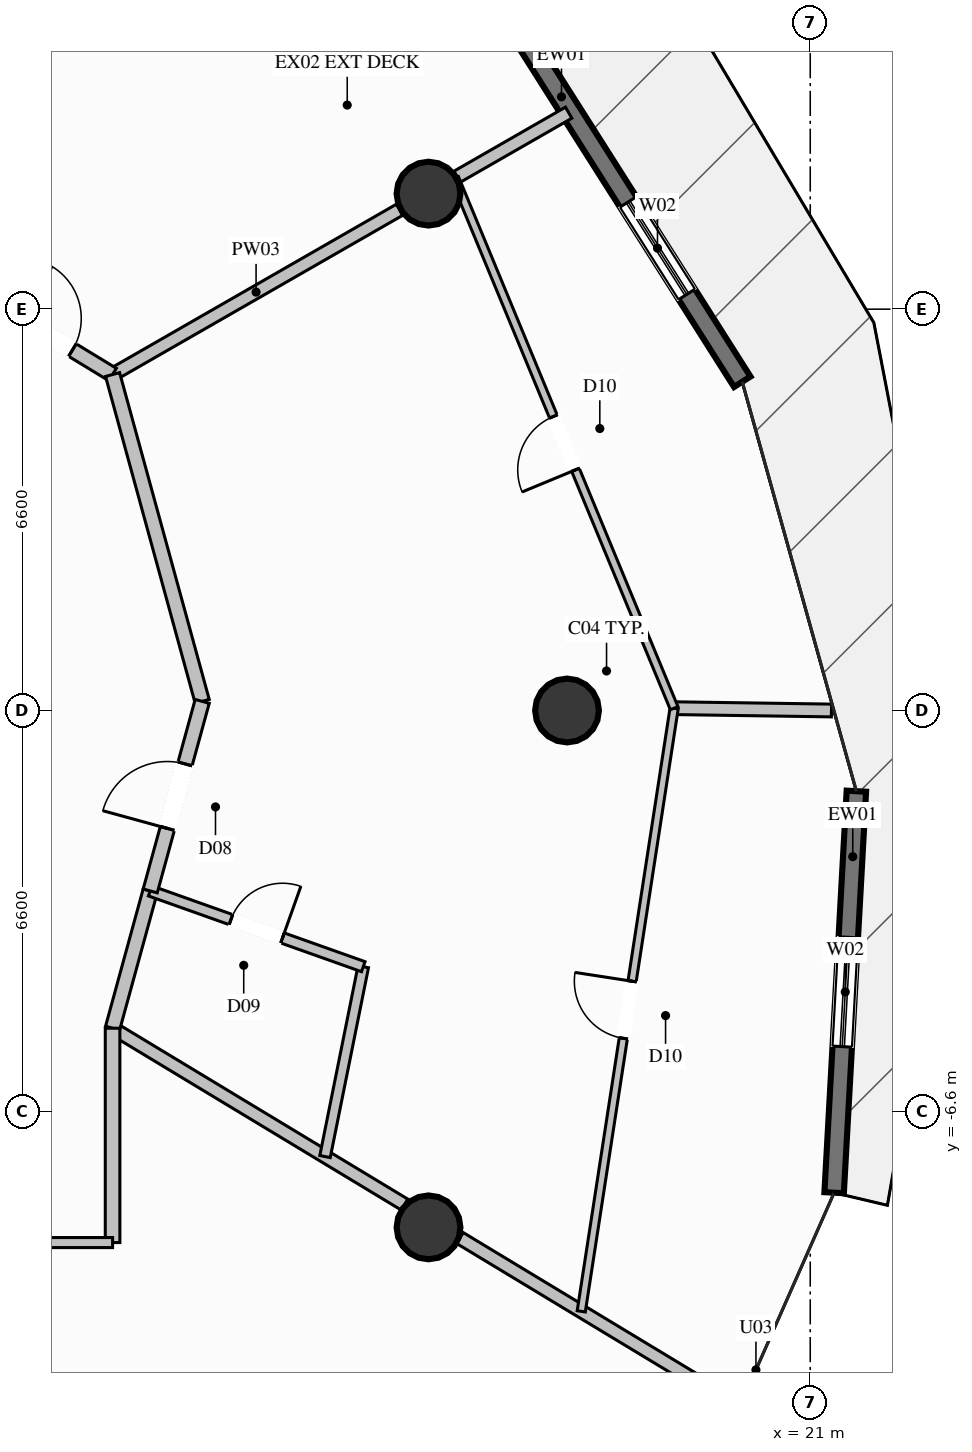
"""IFC4 building model, lengths in metres.
Left out: names, types, materials, properties, quantities, classifications, styles, units other than length and angle.
Written with IfcOpenShell. Run it as: python <this file> out.ifc"""

import sys

from ifc_helpers import new_model, si_unit, direction, frame, frame_2d, origin, origin_2d, place, context, subcontext, project, spatial, rectangle, circle, extrude, element, fill, save


model = new_model("IFC4")
c1 = context("Model", 3, precision=1e-05, world=origin(), true_north=direction((0.0, 1.0)))
c2 = subcontext(c1, "Body", "Model", "MODEL_VIEW")
j1 = project(units=[si_unit("LENGTHUNIT", "METRE"), si_unit("PLANEANGLEUNIT", "RADIAN")], contexts=[c1])
p1 = place(None, origin())
s1 = spatial("IfcSite", under=j1, at=p1, CompositionType="ELEMENT")
p2 = place(p1, origin())
s2 = spatial("IfcBuilding", under=s1, at=p2, CompositionType="ELEMENT")
p3 = place(p2, frame((0.0, 0.0, 117.0)))
s3 = spatial("IfcBuildingStorey", under=s2, at=p3, CompositionType="ELEMENT", Elevation=117.0)
for number, where, z_axis, x_axis in (
    (1, (17.0, 0.0, 0.0), (0.0, 0.0, 1.0), (1.0, 0.0, 0.0)),
    (2, (14.722, 8.5, 0.0), (0.0, 0.0, 1.0), (1.0, 0.0, 0.0)),
    (3, (14.722, -8.5, 0.0), (0.0, 0.0, 1.0), (1.0, 0.0, 0.0)),
):
    element("IfcColumn", number, at=place(p3, frame(where, z_axis=z_axis, x_axis=x_axis)), inside=s3, PredefinedType="COLUMN", context=c2, shape_type="SweptSolid", body=[
        extrude(circle(Radius=0.525, at=origin_2d()), origin(), (0.0, 0.0, 1.0), 3.6),
    ])
p4 = place(p3, frame((21.759, -1.327, 0.0), z_axis=(0.0, 0.0, 1.0), x_axis=(-0.055339161213, -0.998467614516, 0.0)))
e4 = element("IfcWall", 4, at=p4, inside=s3, PredefinedType="SOLIDWALL", context=c2, shape_type="SweptSolid", body=[
    extrude(rectangle(XDim=6.613, YDim=0.32, at=frame_2d((3.307, 0.0))), origin(), (0.0, 0.0, 1.0), 3.35),
])
p5 = place(p4, frame((2.407, 0.0, 0.35)))
e5 = element("IfcOpeningElement", 5, at=p5, cuts=e4, PredefinedType="OPENING", context=c2, shape_type="SweptSolid", body=[
    extrude(rectangle(XDim=1.8, YDim=2.6, at=frame_2d((0.9, 1.3))), frame((0.0, 0.17, 0.0), z_axis=(0.0, -1.0, 0.0), x_axis=(1.0, 0.0, 0.0)), (0.0, 0.0, 1.0), 0.34),
])
p6 = place(p3, frame((15.946, 11.609, 0.0), z_axis=(0.0, 0.0, 1.0), x_axis=(0.535784801187, -0.844354574108, 0.0)))
e6 = element("IfcWall", 6, at=p6, inside=s3, PredefinedType="SOLIDWALL", context=c2, shape_type="SweptSolid", body=[
    extrude(rectangle(XDim=7.346, YDim=0.32, at=frame_2d((3.673, 0.0))), origin(), (0.0, 0.0, 1.0), 3.35),
])
p7 = place(p6, frame((3.844, 0.0, 0.35)))
e7 = element("IfcOpeningElement", 7, at=p7, cuts=e6, PredefinedType="OPENING", context=c2, shape_type="SweptSolid", body=[
    extrude(rectangle(XDim=1.8, YDim=2.6, at=frame_2d((0.9, 1.3))), frame((0.0, 0.17, 0.0), z_axis=(0.0, -1.0, 0.0), x_axis=(1.0, 0.0, 0.0)), (0.0, 0.0, 1.0), 0.34),
])
p8 = place(p3, frame((9.526, 5.525, 0.0), z_axis=(0.0, 0.0, 1.0), x_axis=(0.867217229482, 0.497929991956, 0.0)))
e8 = element("IfcWall", 8, at=p8, inside=s3, PredefinedType="PARTITIONING", context=c2, shape_type="SweptSolid", body=[
    extrude(rectangle(XDim=5.443, YDim=0.21, at=frame_2d((2.721, 0.0))), origin(), (0.0, 0.0, 1.0), 2.791),
])
p9 = place(p3, frame((15.191, 8.777, 0.0), z_axis=(0.0, 0.0, 1.0), x_axis=(0.86728352265, 0.497814514995, 0.0)))
e9 = element("IfcWall", 9, at=p9, inside=s3, PredefinedType="PARTITIONING", context=c2, shape_type="SweptSolid", body=[
    extrude(rectangle(XDim=2.117, YDim=0.21, at=frame_2d((1.059, 0.0))), origin(), (0.0, 0.0, 1.0), 3.35),
])
p10 = place(p3, frame((9.526, -5.225, 0.0), z_axis=(0.0, 0.0, 1.0), x_axis=(0.855972129744, -0.517021965782, 0.0)))
e10 = element("IfcWall", 10, at=p10, inside=s3, PredefinedType="PARTITIONING", context=c2, shape_type="SweptSolid", body=[
    extrude(rectangle(XDim=5.609, YDim=0.21, at=frame_2d((2.804, 0.0))), origin(), (0.0, 0.0, 1.0), 2.791),
])
p11 = place(p3, frame((15.238, -8.675, 0.0), z_axis=(0.0, 0.0, 1.0), x_axis=(0.855909632561, -0.51712542085, 0.0)))
e11 = element("IfcWall", 11, at=p11, inside=s3, PredefinedType="PARTITIONING", context=c2, shape_type="SweptSolid", body=[
    extrude(rectangle(XDim=5.333, YDim=0.21, at=frame_2d((2.667, 0.0))), origin(), (0.0, 0.0, 1.0), 3.35),
])
p12 = place(p3, frame((7.35, 6.85, 0.0), z_axis=(0.0, 0.0, 1.0), x_axis=(0.854057882133, -0.520177982969, 0.0)))
e12 = element("IfcWall", 12, at=p12, inside=s3, PredefinedType="PARTITIONING", context=c2, shape_type="SweptSolid", body=[
    extrude(rectangle(XDim=2.548, YDim=0.24, at=frame_2d((1.274, 0.0))), origin(), (0.0, 0.0, 1.0), 3.35),
])
p13 = place(p12, frame((0.774, 0.0, 0.0)))
e13 = element("IfcOpeningElement", 13, at=p13, cuts=e12, PredefinedType="OPENING", context=c2, shape_type="SweptSolid", body=[
    extrude(rectangle(XDim=1.0, YDim=2.2, at=frame_2d((0.5, 1.1))), frame((0.0, 0.13, 0.0), z_axis=(0.0, -1.0, 0.0), x_axis=(1.0, 0.0, 0.0)), (0.0, 0.0, 1.0), 0.26),
])
p14 = place(p3, frame((9.526, -5.225, 0.0), z_axis=(0.0, 0.0, 1.0), x_axis=(0.264431780812, 0.964404393031, 0.0)))
e14 = element("IfcWall", 14, at=p14, inside=s3, PredefinedType="PARTITIONING", context=c2, shape_type="SweptSolid", body=[
    extrude(rectangle(XDim=2.341, YDim=0.24, at=frame_2d((1.171, 0.0))), origin(), (0.0, 0.0, 1.0), 3.35),
])
p15 = place(p3, frame((13.02, -7.336, 0.0), z_axis=(0.0, 0.0, 1.0), x_axis=(0.197412870908, 0.980320436592, 0.0)))
e15 = element("IfcWall", 15, at=p15, inside=s3, PredefinedType="PLUMBINGWALL", context=c2, shape_type="SweptSolid", body=[
    extrude(rectangle(XDim=3.186, YDim=0.175, at=frame_2d((1.593, 0.0))), origin(), (0.0, 0.0, 1.0), 3.35),
])
p16 = place(p3, frame((10.145, -2.967, 0.0), z_axis=(0.0, 0.0, 1.0), x_axis=(0.942213308765, -0.335013553137, 0.0)))
e16 = element("IfcWall", 16, at=p16, inside=s3, PredefinedType="PLUMBINGWALL", context=c2, shape_type="SweptSolid", body=[
    extrude(rectangle(XDim=3.719, YDim=0.175, at=frame_2d((1.859, 0.0))), origin(), (0.0, 0.0, 1.0), 3.35),
])
p17 = place(p16, frame((1.409, 0.0, 0.0)))
e17 = element("IfcOpeningElement", 17, at=p17, cuts=e16, PredefinedType="OPENING", context=c2, shape_type="SweptSolid", body=[
    extrude(rectangle(XDim=0.9, YDim=2.1, at=frame_2d((0.45, 1.05))), frame((0.0, 0.098, 0.0), z_axis=(0.0, -1.0, 0.0), x_axis=(1.0, 0.0, 0.0)), (0.0, 0.0, 1.0), 0.195),
])
p18 = place(p3, frame((18.762, 0.038, 0.0), z_axis=(0.0, 0.0, 1.0), x_axis=(0.999891661517, -0.014719552628, 0.0)))
e18 = element("IfcWall", 18, at=p18, inside=s3, PredefinedType="PARTITIONING", context=c2, shape_type="SweptSolid", body=[
    extrude(rectangle(XDim=2.587, YDim=0.21, at=frame_2d((1.294, 0.0))), origin(), (0.0, 0.0, 1.0), 3.35),
])
p19 = place(p3, frame((11.0, 0.15, 0.0), z_axis=(0.0, 0.0, 1.0), x_axis=(-0.264488542062, 0.964388827765, 0.0)))
e19 = element("IfcWall", 19, at=p19, inside=s3, PredefinedType="PARTITIONING", context=c2, shape_type="SweptSolid", body=[
    extrude(rectangle(XDim=5.573, YDim=0.24, at=frame_2d((2.787, 0.0))), origin(), (0.0, 0.0, 1.0), 2.985),
])
p20 = place(p3, frame((10.145, -2.967, 0.0), z_axis=(0.0, 0.0, 1.0), x_axis=(0.264529660797, 0.9643775498, 0.0)))
e20 = element("IfcWall", 20, at=p20, inside=s3, PredefinedType="PARTITIONING", context=c2, shape_type="SweptSolid", body=[
    extrude(rectangle(XDim=3.232, YDim=0.24, at=frame_2d((1.616, 0.0))), origin(), (0.0, 0.0, 1.0), 2.985),
])
p21 = place(p20, frame((1.066, 0.0, 0.0)))
e21 = element("IfcOpeningElement", 21, at=p21, cuts=e20, PredefinedType="OPENING", context=c2, shape_type="SweptSolid", body=[
    extrude(rectangle(XDim=1.1, YDim=2.3, at=frame_2d((0.55, 1.15))), frame((0.0, 0.13, 0.0), z_axis=(0.0, -1.0, 0.0), x_axis=(1.0, 0.0, 0.0)), (0.0, 0.0, 1.0), 0.26),
])
p22 = place(p3, frame((17.234, -9.881, 0.0), z_axis=(0.0, 0.0, 1.0), x_axis=(0.152256429378, 0.988341023996, 0.0)))
e22 = element("IfcWall", 22, at=p22, inside=s3, PredefinedType="PARTITIONING", context=c2, shape_type="SweptSolid", body=[
    extrude(rectangle(XDim=10.036, YDim=0.135, at=frame_2d((5.018, 0.0))), origin(), (0.0, 0.0, 1.0), 3.35),
])
p23 = place(p22, frame((4.543, 0.0, 0.0)))
e23 = element("IfcOpeningElement", 23, at=p23, cuts=e22, PredefinedType="OPENING", context=c2, shape_type="SweptSolid", body=[
    extrude(rectangle(XDim=0.95, YDim=2.1, at=frame_2d((0.475, 1.05))), frame((0.0, 0.078, 0.0), z_axis=(0.0, -1.0, 0.0), x_axis=(1.0, 0.0, 0.0)), (0.0, 0.0, 1.0), 0.155),
])
p24 = place(p3, frame((18.762, 0.038, 0.0), z_axis=(0.0, 0.0, 1.0), x_axis=(-0.382615379706, 0.923907717909, 0.0)))
e24 = element("IfcWall", 24, at=p24, inside=s3, PredefinedType="PARTITIONING", context=c2, shape_type="SweptSolid", body=[
    extrude(rectangle(XDim=9.435, YDim=0.135, at=frame_2d((4.717, 0.0))), origin(), (0.0, 0.0, 1.0), 2.877),
])
p25 = place(p24, frame((4.242, 0.0, 0.0)))
e25 = element("IfcOpeningElement", 25, at=p25, cuts=e24, PredefinedType="OPENING", context=c2, shape_type="SweptSolid", body=[
    extrude(rectangle(XDim=0.95, YDim=2.1, at=frame_2d((0.475, 1.05))), frame((0.0, 0.078, 0.0), z_axis=(0.0, -1.0, 0.0), x_axis=(1.0, 0.0, 0.0)), (0.0, 0.0, 1.0), 0.155),
])
p26 = place(p3, frame((5.239, -8.75, 0.0), z_axis=(0.0, 0.0, 1.0), x_axis=(0.584705614476, -0.811245551236, 0.0)))
e26 = element("IfcWall", 26, at=p26, inside=s3, PredefinedType="PARTITIONING", context=c2, shape_type="SweptSolid", body=[
    extrude(rectangle(XDim=12.576, YDim=0.21, at=frame_2d((6.288, 0.0))), origin(), (0.0, 0.0, 1.0), 3.35),
])
p27 = place(p3, frame((9.526, -8.75, 0.0), z_axis=(0.0, 0.0, 1.0), x_axis=(0.0, 1.0, 0.0)))
e27 = element("IfcWall", 27, at=p27, inside=s3, PredefinedType="PARTITIONING", context=c2, shape_type="SweptSolid", body=[
    extrude(rectangle(XDim=3.525, YDim=0.24, at=frame_2d((1.762, 0.0))), origin(), (0.0, 0.0, 1.0), 3.35),
])
p28 = place(p3, frame((5.239, -8.75, 0.0), z_axis=(0.0, 0.0, 1.0), x_axis=(1.0, 0.0, 0.0)))
e28 = element("IfcWall", 28, at=p28, inside=s3, PredefinedType="PARTITIONING", context=c2, shape_type="SweptSolid", body=[
    extrude(rectangle(XDim=4.287, YDim=0.165, at=frame_2d((2.144, 0.0))), origin(), (0.0, 0.0, 1.0), 3.35),
])
p29 = place(p28, frame((1.668, 0.0, 0.0)))
e29 = element("IfcOpeningElement", 29, at=p29, cuts=e28, PredefinedType="OPENING", context=c2, shape_type="SweptSolid", body=[
    extrude(rectangle(XDim=0.95, YDim=2.1, at=frame_2d((0.475, 1.05))), frame((0.0, 0.093, 0.0), z_axis=(0.0, -1.0, 0.0), x_axis=(1.0, 0.0, 0.0)), (0.0, 0.0, 1.0), 0.185),
])
p30 = place(p5, origin())
e30 = element("IfcWindow", 30, at=p30, inside=s3, PartitioningType="SINGLE_PANEL", PredefinedType="WINDOW", context=c2, shape_type="SweptSolid", body=[
    extrude(rectangle(XDim=1.8, YDim=2.6, at=frame_2d((0.9, 1.3))), frame((0.0, 0.03, 0.0), z_axis=(0.0, -1.0, 0.0), x_axis=(1.0, 0.0, 0.0)), (0.0, 0.0, 1.0), 0.06),
])
fill(e5, e30)
p31 = place(p7, origin())
e31 = element("IfcWindow", 31, at=p31, inside=s3, PartitioningType="SINGLE_PANEL", PredefinedType="WINDOW", context=c2, shape_type="SweptSolid", body=[
    extrude(rectangle(XDim=1.8, YDim=2.6, at=frame_2d((0.9, 1.3))), frame((0.0, 0.03, 0.0), z_axis=(0.0, -1.0, 0.0), x_axis=(1.0, 0.0, 0.0)), (0.0, 0.0, 1.0), 0.06),
])
fill(e7, e31)
p32 = place(p13, origin())
e32 = element("IfcDoor", 32, at=p32, inside=s3, OperationType="SINGLE_SWING_LEFT", PredefinedType="DOOR", context=c2, shape_type="SweptSolid", body=[
    extrude(rectangle(XDim=1.0, YDim=2.2, at=frame_2d((0.5, 1.1))), frame((0.0, 0.025, 0.0), z_axis=(0.0, -1.0, 0.0), x_axis=(1.0, 0.0, 0.0)), (0.0, 0.0, 1.0), 0.05),
])
fill(e13, e32)
p33 = place(p17, origin())
e33 = element("IfcDoor", 33, at=p33, inside=s3, OperationType="SINGLE_SWING_RIGHT", PredefinedType="DOOR", context=c2, shape_type="SweptSolid", body=[
    extrude(rectangle(XDim=0.9, YDim=2.1, at=frame_2d((0.45, 1.05))), frame((0.0, 0.025, 0.0), z_axis=(0.0, -1.0, 0.0), x_axis=(1.0, 0.0, 0.0)), (0.0, 0.0, 1.0), 0.05),
])
fill(e17, e33)
p34 = place(p21, origin())
e34 = element("IfcDoor", 34, at=p34, inside=s3, OperationType="SINGLE_SWING_LEFT", PredefinedType="DOOR", context=c2, shape_type="SweptSolid", body=[
    extrude(rectangle(XDim=1.1, YDim=2.3, at=frame_2d((0.55, 1.15))), frame((0.0, 0.025, 0.0), z_axis=(0.0, -1.0, 0.0), x_axis=(1.0, 0.0, 0.0)), (0.0, 0.0, 1.0), 0.05),
])
fill(e21, e34)
p35 = place(p23, origin())
e35 = element("IfcDoor", 35, at=p35, inside=s3, OperationType="SINGLE_SWING_RIGHT", PredefinedType="DOOR", context=c2, shape_type="SweptSolid", body=[
    extrude(rectangle(XDim=0.95, YDim=2.1, at=frame_2d((0.475, 1.05))), frame((0.0, 0.025, 0.0), z_axis=(0.0, -1.0, 0.0), x_axis=(1.0, 0.0, 0.0)), (0.0, 0.0, 1.0), 0.05),
])
fill(e23, e35)
p36 = place(p25, origin())
e36 = element("IfcDoor", 36, at=p36, inside=s3, OperationType="SINGLE_SWING_LEFT", PredefinedType="DOOR", context=c2, shape_type="SweptSolid", body=[
    extrude(rectangle(XDim=0.95, YDim=2.1, at=frame_2d((0.475, 1.05))), frame((0.0, 0.025, 0.0), z_axis=(0.0, -1.0, 0.0), x_axis=(1.0, 0.0, 0.0)), (0.0, 0.0, 1.0), 0.05),
])
fill(e25, e36)
save(model, sys.argv[1])
